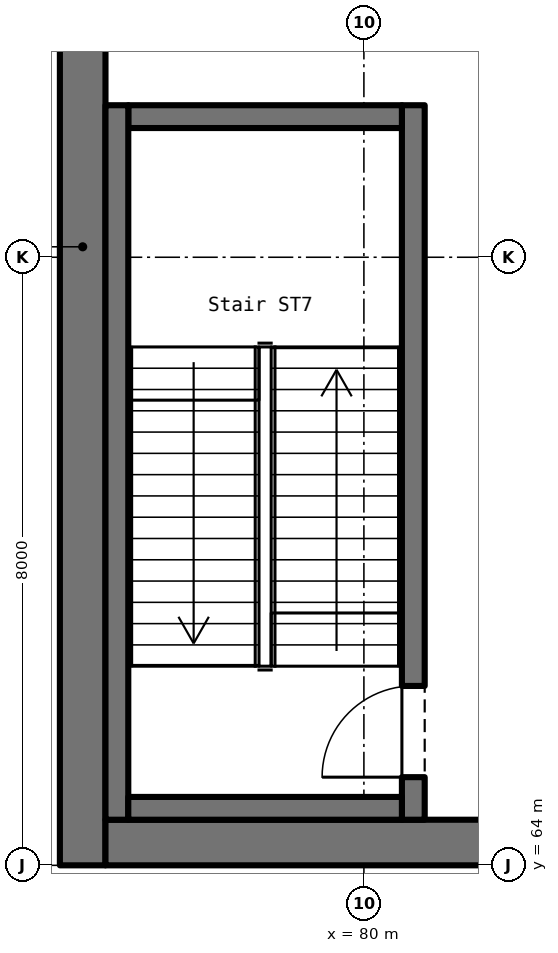
"""IFC4 building model, lengths in metres.
Left out: names, types, materials, properties, quantities, classifications, styles, units other than length and angle.
Written with IfcOpenShell. Run it as: python <this file> out.ifc"""

import sys

from ifc_helpers import new_model, si_unit, direction, frame, frame_2d, origin, place, context, subcontext, project, spatial, rectangle, extrude, element, fill, save


model = new_model("IFC4")
c1 = context("Model", 3, precision=1e-05, world=origin(), true_north=direction((0.0, 1.0)))
c2 = subcontext(c1, "Body", "Model", "MODEL_VIEW")
j1 = project(units=[si_unit("LENGTHUNIT", "METRE"), si_unit("PLANEANGLEUNIT", "RADIAN")], contexts=[c1])
p1 = place(None, origin())
s1 = spatial("IfcSite", under=j1, at=p1, CompositionType="ELEMENT")
p2 = place(p1, origin())
s2 = spatial("IfcBuilding", under=s1, at=p2, CompositionType="ELEMENT")
p3 = place(p2, frame((0.0, 0.0, 17.0)))
s3 = spatial("IfcBuildingStorey", under=s2, at=p3, CompositionType="ELEMENT", Elevation=17.0)
p4 = place(p3, frame((76.3, 64.0, 0.0), z_axis=(0.0, 0.0, 1.0), x_axis=(0.0, 1.0, 0.0)))
e1 = element("IfcWall", 1, at=p4, inside=s3, PredefinedType="SHEAR", context=c2, shape_type="SweptSolid", body=[
    extrude(rectangle(XDim=32.0, YDim=0.6, at=frame_2d((16.0, 0.0))), origin(), (0.0, 0.0, 1.0), 5.5),
])
p5 = place(p4, frame((16.275, 0.0, 1.0)))
e2 = element("IfcOpeningElement", 2, at=p5, cuts=e1, PredefinedType="OPENING", context=c2, shape_type="SweptSolid", body=[
    extrude(rectangle(XDim=0.45, YDim=3.6, at=frame_2d((0.225, 1.8))), frame((0.0, 0.312, 0.0), z_axis=(0.0, -1.0, 0.0), x_axis=(1.0, 0.0, 0.0)), (0.0, 0.0, 1.0), 0.624),
])
p6 = place(p4, frame((19.275, 0.0, 1.0)))
e3 = element("IfcOpeningElement", 3, at=p6, cuts=e1, PredefinedType="OPENING", context=c2, shape_type="SweptSolid", body=[
    extrude(rectangle(XDim=0.45, YDim=3.6, at=frame_2d((0.225, 1.8))), frame((0.0, 0.312, 0.0), z_axis=(0.0, -1.0, 0.0), x_axis=(1.0, 0.0, 0.0)), (0.0, 0.0, 1.0), 0.624),
])
p7 = place(p3, frame((76.6, 64.3, 0.0), z_axis=(0.0, 0.0, 1.0), x_axis=(1.0, 0.0, 0.0)))
e4 = element("IfcWall", 4, at=p7, inside=s3, PredefinedType="SHEAR", context=c2, shape_type="SweptSolid", body=[
    extrude(rectangle(XDim=38.8, YDim=0.6, at=frame_2d((19.4, 0.0))), origin(), (0.0, 0.0, 1.0), 5.5),
])
p8 = place(p3, frame((80.65, 64.6, 0.0), z_axis=(0.0, 0.0, 1.0), x_axis=(0.0, 1.0, 0.0)))
e5 = element("IfcWall", 5, at=p8, inside=s3, PredefinedType="SOLIDWALL", context=c2, shape_type="SweptSolid", body=[
    extrude(rectangle(XDim=9.4, YDim=0.3, at=frame_2d((4.7, 0.0))), origin(), (0.0, 0.0, 1.0), 5.5),
])
p9 = place(p8, frame((0.56, 0.0, 0.0)))
e6 = element("IfcOpeningElement", 6, at=p9, cuts=e5, PredefinedType="OPENING", context=c2, shape_type="SweptSolid", body=[
    extrude(rectangle(XDim=1.2, YDim=2.1, at=frame_2d((0.6, 1.05))), frame((0.0, 0.162, 0.0), z_axis=(0.0, -1.0, 0.0), x_axis=(1.0, 0.0, 0.0)), (0.0, 0.0, 1.0), 0.324),
])
p10 = place(p3, frame((80.5, 73.85, 0.0), z_axis=(0.0, 0.0, 1.0), x_axis=(-1.0, 0.0, 0.0)))
e7 = element("IfcWall", 7, at=p10, inside=s3, PredefinedType="SOLIDWALL", context=c2, shape_type="SweptSolid", body=[
    extrude(rectangle(XDim=3.6, YDim=0.3, at=frame_2d((1.8, 0.0))), origin(), (0.0, 0.0, 1.0), 5.5),
])
p11 = place(p3, frame((76.75, 74.0, 0.0), z_axis=(0.0, 0.0, 1.0), x_axis=(0.0, -1.0, 0.0)))
e8 = element("IfcWall", 8, at=p11, inside=s3, PredefinedType="SOLIDWALL", context=c2, shape_type="SweptSolid", body=[
    extrude(rectangle(XDim=9.4, YDim=0.3, at=frame_2d((4.7, 0.0))), origin(), (0.0, 0.0, 1.0), 5.5),
])
p12 = place(p3, frame((76.9, 64.75, 0.0), z_axis=(0.0, 0.0, 1.0), x_axis=(1.0, 0.0, 0.0)))
e9 = element("IfcWall", 9, at=p12, inside=s3, PredefinedType="SOLIDWALL", context=c2, shape_type="SweptSolid", body=[
    extrude(rectangle(XDim=3.6, YDim=0.3, at=frame_2d((1.8, 0.0))), origin(), (0.0, 0.0, 1.0), 5.5),
])
p13 = place(p9, origin())
e10 = element("IfcDoor", 10, at=p13, inside=s3, OperationType="SINGLE_SWING_LEFT", PredefinedType="DOOR", context=c2, shape_type="SweptSolid", body=[
    extrude(rectangle(XDim=1.2, YDim=2.1, at=frame_2d((0.6, 1.05))), frame((0.0, 0.025, 0.0), z_axis=(0.0, -1.0, 0.0), x_axis=(1.0, 0.0, 0.0)), (0.0, 0.0, 1.0), 0.05),
])
fill(e6, e10)
save(model, sys.argv[1])
